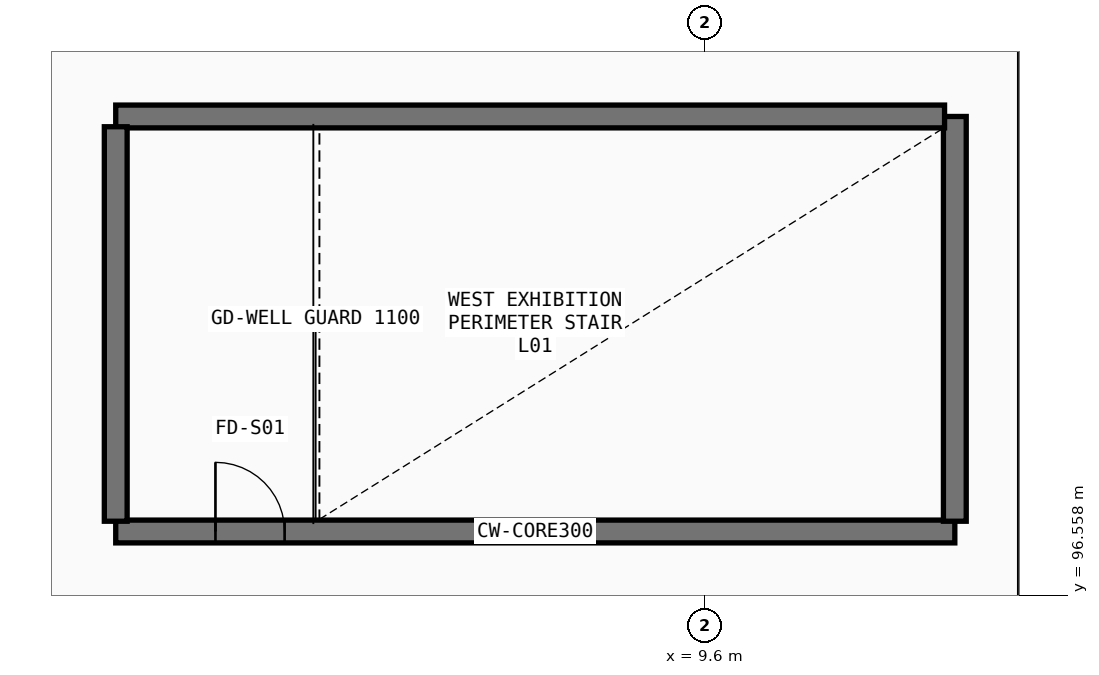
"""IFC4 building model, lengths in metres.
Left out: names, types, materials, properties, quantities, classifications, styles, units other than length and angle.
Written with IfcOpenShell. Run it as: python <this file> out.ifc"""

import sys

from ifc_helpers import new_model, si_unit, direction, frame, frame_2d, origin, place, context, subcontext, project, spatial, rectangle, extrude, element, fill, save


model = new_model("IFC4")
c1 = context("Model", 3, precision=1e-05, world=origin(), true_north=direction((0.0, 1.0)))
c2 = subcontext(c1, "Body", "Model", "MODEL_VIEW")
j1 = project(units=[si_unit("LENGTHUNIT", "METRE"), si_unit("PLANEANGLEUNIT", "RADIAN")], contexts=[c1])
p1 = place(None, origin())
s1 = spatial("IfcSite", under=j1, at=p1, CompositionType="ELEMENT")
p2 = place(p1, origin())
s2 = spatial("IfcBuilding", under=s1, at=p2, CompositionType="ELEMENT")
p3 = place(p2, frame((0.0, 0.0, 6.0)))
s3 = spatial("IfcBuildingStorey", under=s2, at=p3, CompositionType="ELEMENT", Elevation=6.0)
p4 = place(p3, frame((1.85, 97.4, 0.0), z_axis=(0.0, 0.0, 1.0), x_axis=(1.0, 0.0, 0.0)))
e1 = element("IfcWall", 1, at=p4, inside=s3, PredefinedType="SHEAR", context=c2, shape_type="SweptSolid", body=[
    extrude(rectangle(XDim=11.04, YDim=0.3, at=frame_2d((5.52, 0.0))), origin(), (0.0, 0.0, 1.0), 5.155),
])
p5 = place(p4, frame((1.312, 0.0, 0.0)))
e2 = element("IfcOpeningElement", 2, at=p5, cuts=e1, PredefinedType="OPENING", context=c2, shape_type="SweptSolid", body=[
    extrude(rectangle(XDim=0.91, YDim=2.08, at=frame_2d((0.455, 1.04))), frame((0.0, 0.16, 0.0), z_axis=(0.0, -1.0, 0.0), x_axis=(1.0, 0.0, 0.0)), (0.0, 0.0, 1.0), 0.32),
])
p6 = place(p3, frame((12.89, 97.535, 0.0), z_axis=(0.0, 0.0, 1.0), x_axis=(0.0, 1.0, 0.0)))
e3 = element("IfcWall", 3, at=p6, inside=s3, PredefinedType="SHEAR", context=c2, shape_type="SweptSolid", body=[
    extrude(rectangle(XDim=5.325, YDim=0.3, at=frame_2d((2.663, 0.0))), origin(), (0.0, 0.0, 1.0), 5.155),
])
p7 = place(p3, frame((12.755, 102.86, 0.0), z_axis=(0.0, 0.0, 1.0), x_axis=(-1.0, 0.0, 0.0)))
e4 = element("IfcWall", 4, at=p7, inside=s3, PredefinedType="SHEAR", context=c2, shape_type="SweptSolid", body=[
    extrude(rectangle(XDim=10.905, YDim=0.3, at=frame_2d((5.452, 0.0))), origin(), (0.0, 0.0, 1.0), 5.155),
])
p8 = place(p3, frame((1.85, 102.725, 0.0), z_axis=(0.0, 0.0, 1.0), x_axis=(0.0, -1.0, 0.0)))
e5 = element("IfcWall", 5, at=p8, inside=s3, PredefinedType="SHEAR", context=c2, shape_type="SweptSolid", body=[
    extrude(rectangle(XDim=5.19, YDim=0.3, at=frame_2d((2.595, 0.0))), origin(), (0.0, 0.0, 1.0), 5.155),
])
p9 = place(p5, origin())
e6 = element("IfcDoor", 6, at=p9, inside=s3, OperationType="SINGLE_SWING_LEFT", PredefinedType="DOOR", context=c2, shape_type="SweptSolid", body=[
    extrude(rectangle(XDim=0.91, YDim=2.08, at=frame_2d((0.455, 1.04))), frame((0.0, 0.025, 0.0), z_axis=(0.0, -1.0, 0.0), x_axis=(1.0, 0.0, 0.0)), (0.0, 0.0, 1.0), 0.05),
])
fill(e2, e6)
save(model, sys.argv[1])
